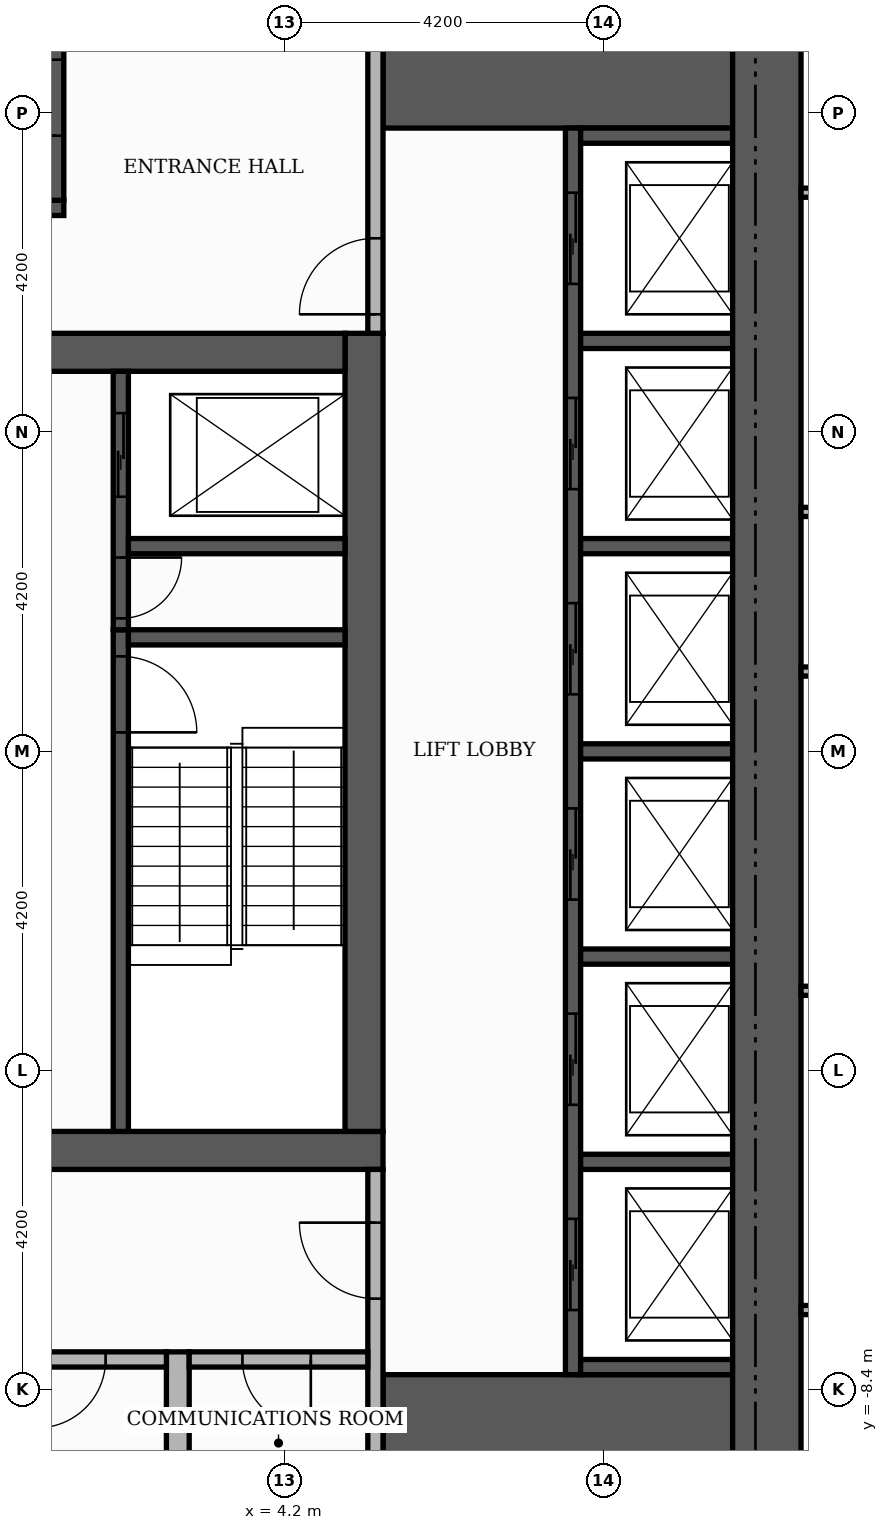
"""IFC4 building model, lengths in metres.
Left out: names, types, materials, properties, quantities, classifications, styles, units other than length and angle.
Written with IfcOpenShell. Run it as: python <this file> out.ifc"""

import sys

from ifc_helpers import new_model, si_unit, direction, frame, frame_2d, origin, place, context, subcontext, project, spatial, rectangle, extrude, element, fill, save


model = new_model("IFC4")
c1 = context("Model", 3, precision=1e-05, world=origin(), true_north=direction((0.0, 1.0)))
c2 = subcontext(c1, "Body", "Model", "MODEL_VIEW")
j1 = project(units=[si_unit("LENGTHUNIT", "METRE"), si_unit("PLANEANGLEUNIT", "RADIAN")], contexts=[c1])
p1 = place(None, origin())
s1 = spatial("IfcSite", under=j1, at=p1, CompositionType="ELEMENT")
p2 = place(p1, origin())
s2 = spatial("IfcBuilding", under=s1, at=p2, CompositionType="ELEMENT")
p3 = place(p2, frame((0.0, 0.0, 168.9)))
s3 = spatial("IfcBuildingStorey", under=s2, at=p3, CompositionType="ELEMENT", Elevation=168.9)
p4 = place(p3, frame((-5.5, -5.25, 0.0), z_axis=(0.0, 0.0, 1.0), x_axis=(1.0, 0.0, 0.0)))
e1 = element("IfcWall", 1, at=p4, inside=s3, PredefinedType="SHEAR", context=c2, shape_type="SweptSolid", body=[
    extrude(rectangle(XDim=11.0, YDim=0.5, at=frame_2d((5.5, 0.0))), origin(), (0.0, 0.0, 1.0), 3.48),
])
p5 = place(p4, frame((4.9, 0.0, 0.0)))
e2 = element("IfcOpeningElement", 2, at=p5, cuts=e1, PredefinedType="OPENING", context=c2, shape_type="SweptSolid", body=[
    extrude(rectangle(XDim=1.2, YDim=2.1, at=frame_2d((0.6, 1.05))), frame((0.0, 0.26, 0.0), z_axis=(0.0, -1.0, 0.0), x_axis=(1.0, 0.0, 0.0)), (0.0, 0.0, 1.0), 0.52),
])
p6 = place(p3, frame((5.25, -5.0, 0.0), z_axis=(0.0, 0.0, 1.0), x_axis=(0.0, 1.0, 0.0)))
e3 = element("IfcWall", 3, at=p6, inside=s3, PredefinedType="SHEAR", context=c2, shape_type="SweptSolid", body=[
    extrude(rectangle(XDim=10.5, YDim=0.5, at=frame_2d((5.25, 0.0))), origin(), (0.0, 0.0, 1.0), 3.48),
])
p7 = place(p3, frame((-5.0, 5.25, 0.0), z_axis=(0.0, 0.0, 1.0), x_axis=(1.0, 0.0, 0.0)))
e4 = element("IfcWall", 4, at=p7, inside=s3, PredefinedType="SHEAR", context=c2, shape_type="SweptSolid", body=[
    extrude(rectangle(XDim=10.0, YDim=0.5, at=frame_2d((5.0, 0.0))), origin(), (0.0, 0.0, 1.0), 3.48),
])
p8 = place(p7, frame((4.4, 0.0, 0.0)))
e5 = element("IfcOpeningElement", 5, at=p8, cuts=e4, PredefinedType="OPENING", context=c2, shape_type="SweptSolid", body=[
    extrude(rectangle(XDim=1.2, YDim=2.1, at=frame_2d((0.6, 1.05))), frame((0.0, 0.26, 0.0), z_axis=(0.0, -1.0, 0.0), x_axis=(1.0, 0.0, 0.0)), (0.0, 0.0, 1.0), 0.52),
])
for number, where, z_axis, x_axis in (
    (6, (5.5, -9.15, 0.0), (0.0, 0.0, 1.0), (1.0, 0.0, 0.0)),
    (7, (5.5, 9.15, 0.0), (0.0, 0.0, 1.0), (1.0, 0.0, 0.0)),
):
    element("IfcWall", number, at=place(p3, frame(where, z_axis=z_axis, x_axis=x_axis)), inside=s3, PredefinedType="SHEAR", context=c2, shape_type="SweptSolid", body=[
        extrude(rectangle(XDim=4.6, YDim=1.9, at=frame_2d((2.3, 0.0))), origin(), (0.0, 0.0, 1.0), 3.48),
    ])
p9 = place(p3, frame((2.05, -5.0, 0.0), z_axis=(0.0, 0.0, 1.0), x_axis=(0.0, 1.0, 0.0)))
e8 = element("IfcWall", 8, at=p9, inside=s3, PredefinedType="SHEAR", context=c2, shape_type="SweptSolid", body=[
    extrude(rectangle(XDim=6.6, YDim=0.2, at=frame_2d((3.3, 0.0))), origin(), (0.0, 0.0, 1.0), 3.48),
])
p10 = place(p9, frame((5.25, 0.0, 0.0)))
e9 = element("IfcOpeningElement", 9, at=p10, cuts=e8, PredefinedType="OPENING", context=c2, shape_type="SweptSolid", body=[
    extrude(rectangle(XDim=1.0, YDim=2.1, at=frame_2d((0.5, 1.05))), frame((0.0, 0.11, 0.0), z_axis=(0.0, -1.0, 0.0), x_axis=(1.0, 0.0, 0.0)), (0.0, 0.0, 1.0), 0.22),
])
p11 = place(p3, frame((2.15, 1.5, 0.0), z_axis=(0.0, 0.0, 1.0), x_axis=(1.0, 0.0, 0.0)))
e10 = element("IfcWall", 10, at=p11, inside=s3, PredefinedType="SHEAR", context=c2, shape_type="SweptSolid", body=[
    extrude(rectangle(XDim=2.85, YDim=0.2, at=frame_2d((1.425, 0.0))), origin(), (0.0, 0.0, 1.0), 3.48),
])
p12 = place(p3, frame((-5.5, 7.15, 0.0), z_axis=(0.0, 0.0, 1.0), x_axis=(1.0, 0.0, 0.0)))
e11 = element("IfcWall", 11, at=p12, inside=s3, PredefinedType="SHEAR", context=c2, shape_type="SweptSolid", body=[
    extrude(rectangle(XDim=6.8, YDim=0.2, at=frame_2d((3.4, 0.0))), origin(), (0.0, 0.0, 1.0), 3.48),
])
p13 = place(p3, frame((1.2, 7.25, 0.0), z_axis=(0.0, 0.0, 1.0), x_axis=(0.0, 1.0, 0.0)))
e12 = element("IfcWall", 12, at=p13, inside=s3, PredefinedType="SHEAR", context=c2, shape_type="SweptSolid", body=[
    extrude(rectangle(XDim=2.85, YDim=0.2, at=frame_2d((1.425, 0.0))), origin(), (0.0, 0.0, 1.0), 3.48),
])
p14 = place(p13, frame((0.85, 0.0, 0.0)))
e13 = element("IfcOpeningElement", 13, at=p14, cuts=e12, PredefinedType="OPENING", context=c2, shape_type="SweptSolid", body=[
    extrude(rectangle(XDim=1.0, YDim=2.1, at=frame_2d((0.5, 1.05))), frame((0.0, 0.11, 0.0), z_axis=(0.0, -1.0, 0.0), x_axis=(1.0, 0.0, 0.0)), (0.0, 0.0, 1.0), 0.22),
])
p15 = place(p3, frame((8.0, -8.2, 0.0), z_axis=(0.0, 0.0, 1.0), x_axis=(0.0, 1.0, 0.0)))
e14 = element("IfcWall", 14, at=p15, inside=s3, PredefinedType="SHEAR", context=c2, shape_type="SweptSolid", body=[
    extrude(rectangle(XDim=16.4, YDim=0.2, at=frame_2d((8.2, 0.0))), origin(), (0.0, 0.0, 1.0), 3.48),
])
p16 = place(p15, frame((0.85, 0.0, 0.0)))
e15 = element("IfcOpeningElement", 15, at=p16, cuts=e14, PredefinedType="OPENING", context=c2, shape_type="SweptSolid", body=[
    extrude(rectangle(XDim=1.2, YDim=2.1, at=frame_2d((0.6, 1.05))), frame((0.0, 0.11, 0.0), z_axis=(0.0, -1.0, 0.0), x_axis=(1.0, 0.0, 0.0)), (0.0, 0.0, 1.0), 0.22),
])
p17 = place(p15, frame((3.55, 0.0, 0.0)))
e16 = element("IfcOpeningElement", 16, at=p17, cuts=e14, PredefinedType="OPENING", context=c2, shape_type="SweptSolid", body=[
    extrude(rectangle(XDim=1.2, YDim=2.1, at=frame_2d((0.6, 1.05))), frame((0.0, 0.11, 0.0), z_axis=(0.0, -1.0, 0.0), x_axis=(1.0, 0.0, 0.0)), (0.0, 0.0, 1.0), 0.22),
])
p18 = place(p15, frame((6.25, 0.0, 0.0)))
e17 = element("IfcOpeningElement", 17, at=p18, cuts=e14, PredefinedType="OPENING", context=c2, shape_type="SweptSolid", body=[
    extrude(rectangle(XDim=1.2, YDim=2.1, at=frame_2d((0.6, 1.05))), frame((0.0, 0.11, 0.0), z_axis=(0.0, -1.0, 0.0), x_axis=(1.0, 0.0, 0.0)), (0.0, 0.0, 1.0), 0.22),
])
p19 = place(p15, frame((8.95, 0.0, 0.0)))
e18 = element("IfcOpeningElement", 18, at=p19, cuts=e14, PredefinedType="OPENING", context=c2, shape_type="SweptSolid", body=[
    extrude(rectangle(XDim=1.2, YDim=2.1, at=frame_2d((0.6, 1.05))), frame((0.0, 0.11, 0.0), z_axis=(0.0, -1.0, 0.0), x_axis=(1.0, 0.0, 0.0)), (0.0, 0.0, 1.0), 0.22),
])
p20 = place(p15, frame((11.65, 0.0, 0.0)))
e19 = element("IfcOpeningElement", 19, at=p20, cuts=e14, PredefinedType="OPENING", context=c2, shape_type="SweptSolid", body=[
    extrude(rectangle(XDim=1.2, YDim=2.1, at=frame_2d((0.6, 1.05))), frame((0.0, 0.11, 0.0), z_axis=(0.0, -1.0, 0.0), x_axis=(1.0, 0.0, 0.0)), (0.0, 0.0, 1.0), 0.22),
])
p21 = place(p15, frame((14.35, 0.0, 0.0)))
e20 = element("IfcOpeningElement", 20, at=p21, cuts=e14, PredefinedType="OPENING", context=c2, shape_type="SweptSolid", body=[
    extrude(rectangle(XDim=1.2, YDim=2.1, at=frame_2d((0.6, 1.05))), frame((0.0, 0.11, 0.0), z_axis=(0.0, -1.0, 0.0), x_axis=(1.0, 0.0, 0.0)), (0.0, 0.0, 1.0), 0.22),
])
for number, where, z_axis, x_axis in (
    (21, (8.1, -8.1, 0.0), (0.0, 0.0, 1.0), (1.0, 0.0, 0.0)),
    (22, (8.1, -5.4, 0.0), (0.0, 0.0, 1.0), (1.0, 0.0, 0.0)),
    (23, (8.1, -2.7, 0.0), (0.0, 0.0, 1.0), (1.0, 0.0, 0.0)),
    (24, (8.1, 0.0, 0.0), (0.0, 0.0, 1.0), (1.0, 0.0, 0.0)),
):
    element("IfcWall", number, at=place(p3, frame(where, z_axis=z_axis, x_axis=x_axis)), inside=s3, PredefinedType="SHEAR", context=c2, shape_type="SweptSolid", body=[
        extrude(rectangle(XDim=2.0, YDim=0.2, at=frame_2d((1.0, 0.0))), origin(), (0.0, 0.0, 1.0), 3.48),
    ])
p22 = place(p3, frame((2.05, 1.6, 0.0), z_axis=(0.0, 0.0, 1.0), x_axis=(0.0, 1.0, 0.0)))
e25 = element("IfcWall", 25, at=p22, inside=s3, PredefinedType="SHEAR", context=c2, shape_type="SweptSolid", body=[
    extrude(rectangle(XDim=3.4, YDim=0.2, at=frame_2d((1.7, 0.0))), origin(), (0.0, 0.0, 1.0), 3.48),
])
p23 = place(p22, frame((1.75, 0.0, 0.0)))
e26 = element("IfcOpeningElement", 26, at=p23, cuts=e25, PredefinedType="OPENING", context=c2, shape_type="SweptSolid", body=[
    extrude(rectangle(XDim=1.1, YDim=2.1, at=frame_2d((0.55, 1.05))), frame((0.0, 0.11, 0.0), z_axis=(0.0, -1.0, 0.0), x_axis=(1.0, 0.0, 0.0)), (0.0, 0.0, 1.0), 0.22),
])
p24 = place(p22, frame((0.15, 0.0, 0.0)))
e27 = element("IfcOpeningElement", 27, at=p24, cuts=e25, PredefinedType="OPENING", context=c2, shape_type="SweptSolid", body=[
    extrude(rectangle(XDim=0.8, YDim=2.1, at=frame_2d((0.4, 1.05))), frame((0.0, 0.11, 0.0), z_axis=(0.0, -1.0, 0.0), x_axis=(1.0, 0.0, 0.0)), (0.0, 0.0, 1.0), 0.22),
])
p25 = place(p3, frame((2.15, 2.7, 0.0), z_axis=(0.0, 0.0, 1.0), x_axis=(1.0, 0.0, 0.0)))
e28 = element("IfcWall", 28, at=p25, inside=s3, PredefinedType="SHEAR", context=c2, shape_type="SweptSolid", body=[
    extrude(rectangle(XDim=2.85, YDim=0.2, at=frame_2d((1.425, 0.0))), origin(), (0.0, 0.0, 1.0), 3.48),
])
for number, where, z_axis, x_axis in (
    (29, (8.1, 2.7, 0.0), (0.0, 0.0, 1.0), (1.0, 0.0, 0.0)),
    (30, (8.1, 5.4, 0.0), (0.0, 0.0, 1.0), (1.0, 0.0, 0.0)),
    (31, (8.1, 8.1, 0.0), (0.0, 0.0, 1.0), (1.0, 0.0, 0.0)),
):
    element("IfcWall", number, at=place(p3, frame(where, z_axis=z_axis, x_axis=x_axis)), inside=s3, PredefinedType="SHEAR", context=c2, shape_type="SweptSolid", body=[
        extrude(rectangle(XDim=2.0, YDim=0.2, at=frame_2d((1.0, 0.0))), origin(), (0.0, 0.0, 1.0), 3.48),
    ])
p26 = place(p3, frame((10.55, -10.1, 0.0), z_axis=(0.0, 0.0, 1.0), x_axis=(0.0, 1.0, 0.0)))
e32 = element("IfcWall", 32, at=p26, inside=s3, PredefinedType="SHEAR", context=c2, shape_type="SweptSolid", body=[
    extrude(rectangle(XDim=20.2, YDim=0.9, at=frame_2d((10.1, 0.0))), origin(), (0.0, 0.0, 1.0), 3.48),
])
p27 = place(p3, frame((2.8, -10.1, 0.0), z_axis=(0.0, 0.0, 1.0), x_axis=(0.0, 1.0, 0.0)))
e33 = element("IfcWall", 33, at=p27, inside=s3, PredefinedType="PARTITIONING", context=c2, shape_type="SweptSolid", body=[
    extrude(rectangle(XDim=2.2, YDim=0.3, at=frame_2d((1.1, 0.0))), origin(), (0.0, 0.0, 1.0), 3.48),
])
p28 = place(p3, frame((5.4, -10.1, 0.0), z_axis=(0.0, 0.0, 1.0), x_axis=(0.0, 1.0, 0.0)))
e34 = element("IfcWall", 34, at=p28, inside=s3, PredefinedType="PARTITIONING", context=c2, shape_type="SweptSolid", body=[
    extrude(rectangle(XDim=4.6, YDim=0.2, at=frame_2d((2.3, 0.0))), origin(), (0.0, 0.0, 1.0), 3.48),
])
p29 = place(p28, frame((2.9, 0.0, 0.0)))
e35 = element("IfcOpeningElement", 35, at=p29, cuts=e34, PredefinedType="OPENING", context=c2, shape_type="SweptSolid", body=[
    extrude(rectangle(XDim=1.0, YDim=2.1, at=frame_2d((0.5, 1.05))), frame((0.0, 0.11, 0.0), z_axis=(0.0, -1.0, 0.0), x_axis=(1.0, 0.0, 0.0)), (0.0, 0.0, 1.0), 0.22),
])
p30 = place(p3, frame((0.1, -8.0, 0.0), z_axis=(0.0, 0.0, 1.0), x_axis=(1.0, 0.0, 0.0)))
e36 = element("IfcWall", 36, at=p30, inside=s3, PredefinedType="PARTITIONING", context=c2, shape_type="SweptSolid", body=[
    extrude(rectangle(XDim=2.55, YDim=0.2, at=frame_2d((1.275, 0.0))), origin(), (0.0, 0.0, 1.0), 3.48),
])
p31 = place(p30, frame((0.85, 0.0, 0.0)))
e37 = element("IfcOpeningElement", 37, at=p31, cuts=e36, PredefinedType="OPENING", context=c2, shape_type="SweptSolid", body=[
    extrude(rectangle(XDim=0.9, YDim=2.1, at=frame_2d((0.45, 1.05))), frame((0.0, 0.11, 0.0), z_axis=(0.0, -1.0, 0.0), x_axis=(1.0, 0.0, 0.0)), (0.0, 0.0, 1.0), 0.22),
])
p32 = place(p3, frame((2.95, -8.0, 0.0), z_axis=(0.0, 0.0, 1.0), x_axis=(1.0, 0.0, 0.0)))
e38 = element("IfcWall", 38, at=p32, inside=s3, PredefinedType="PARTITIONING", context=c2, shape_type="SweptSolid", body=[
    extrude(rectangle(XDim=2.35, YDim=0.2, at=frame_2d((1.175, 0.0))), origin(), (0.0, 0.0, 1.0), 3.48),
])
p33 = place(p32, frame((0.7, 0.0, 0.0)))
e39 = element("IfcOpeningElement", 39, at=p33, cuts=e38, PredefinedType="OPENING", context=c2, shape_type="SweptSolid", body=[
    extrude(rectangle(XDim=0.9, YDim=2.1, at=frame_2d((0.45, 1.05))), frame((0.0, 0.11, 0.0), z_axis=(0.0, -1.0, 0.0), x_axis=(1.0, 0.0, 0.0)), (0.0, 0.0, 1.0), 0.22),
])
p34 = place(p3, frame((5.4, 5.5, 0.0), z_axis=(0.0, 0.0, 1.0), x_axis=(0.0, 1.0, 0.0)))
e40 = element("IfcWall", 40, at=p34, inside=s3, PredefinedType="PARTITIONING", context=c2, shape_type="SweptSolid", body=[
    extrude(rectangle(XDim=4.6, YDim=0.2, at=frame_2d((2.3, 0.0))), origin(), (0.0, 0.0, 1.0), 3.48),
])
p35 = place(p34, frame((0.25, 0.0, 0.0)))
e41 = element("IfcOpeningElement", 41, at=p35, cuts=e40, PredefinedType="OPENING", context=c2, shape_type="SweptSolid", body=[
    extrude(rectangle(XDim=1.0, YDim=2.1, at=frame_2d((0.5, 1.05))), frame((0.0, 0.11, 0.0), z_axis=(0.0, -1.0, 0.0), x_axis=(1.0, 0.0, 0.0)), (0.0, 0.0, 1.0), 0.22),
])
p36 = place(p3, frame((11.0, -7.35, 0.0), z_axis=(0.0, 0.0, 1.0), x_axis=(1.0, 0.0, 0.0)))
e42 = element("IfcWall", 42, at=p36, inside=s3, PredefinedType="PARTITIONING", context=c2, shape_type="SweptSolid", body=[
    extrude(rectangle(XDim=7.32, YDim=0.12, at=frame_2d((3.66, 0.0))), origin(), (0.0, 0.0, 1.0), 3.48),
])
p37 = place(p36, frame((3.21, 0.0, 0.0)))
e43 = element("IfcOpeningElement", 43, at=p37, cuts=e42, PredefinedType="OPENING", context=c2, shape_type="SweptSolid", body=[
    extrude(rectangle(XDim=0.9, YDim=2.1, at=frame_2d((0.45, 1.05))), frame((0.0, 0.07, 0.0), z_axis=(0.0, -1.0, 0.0), x_axis=(1.0, 0.0, 0.0)), (0.0, 0.0, 1.0), 0.14),
])
for number, where, z_axis, x_axis in (
    (44, (11.0, -3.15, 0.0), (0.0, 0.0, 1.0), (1.0, 0.0, 0.0)),
    (45, (11.0, 1.05, 0.0), (0.0, 0.0, 1.0), (1.0, 0.0, 0.0)),
    (46, (11.0, 3.15, 0.0), (0.0, 0.0, 1.0), (1.0, 0.0, 0.0)),
    (47, (11.0, 7.35, 0.0), (0.0, 0.0, 1.0), (1.0, 0.0, 0.0)),
):
    element("IfcWall", number, at=place(p3, frame(where, z_axis=z_axis, x_axis=x_axis)), inside=s3, PredefinedType="PARTITIONING", context=c2, shape_type="SweptSolid", body=[
        extrude(rectangle(XDim=7.32, YDim=0.12, at=frame_2d((3.66, 0.0))), origin(), (0.0, 0.0, 1.0), 3.48),
    ])
p38 = place(p16, origin())
e48 = element("IfcDoor", 48, at=p38, inside=s3, OperationType="SLIDING_TO_LEFT", PredefinedType="DOOR", context=c2, shape_type="SweptSolid", body=[
    extrude(rectangle(XDim=1.2, YDim=2.1, at=frame_2d((0.6, 1.05))), frame((0.0, 0.025, 0.0), z_axis=(0.0, -1.0, 0.0), x_axis=(1.0, 0.0, 0.0)), (0.0, 0.0, 1.0), 0.05),
])
fill(e15, e48)
p39 = place(p17, origin())
e49 = element("IfcDoor", 49, at=p39, inside=s3, OperationType="SLIDING_TO_LEFT", PredefinedType="DOOR", context=c2, shape_type="SweptSolid", body=[
    extrude(rectangle(XDim=1.2, YDim=2.1, at=frame_2d((0.6, 1.05))), frame((0.0, 0.025, 0.0), z_axis=(0.0, -1.0, 0.0), x_axis=(1.0, 0.0, 0.0)), (0.0, 0.0, 1.0), 0.05),
])
fill(e16, e49)
p40 = place(p18, origin())
e50 = element("IfcDoor", 50, at=p40, inside=s3, OperationType="SLIDING_TO_LEFT", PredefinedType="DOOR", context=c2, shape_type="SweptSolid", body=[
    extrude(rectangle(XDim=1.2, YDim=2.1, at=frame_2d((0.6, 1.05))), frame((0.0, 0.025, 0.0), z_axis=(0.0, -1.0, 0.0), x_axis=(1.0, 0.0, 0.0)), (0.0, 0.0, 1.0), 0.05),
])
fill(e17, e50)
p41 = place(p19, origin())
e51 = element("IfcDoor", 51, at=p41, inside=s3, OperationType="SLIDING_TO_LEFT", PredefinedType="DOOR", context=c2, shape_type="SweptSolid", body=[
    extrude(rectangle(XDim=1.2, YDim=2.1, at=frame_2d((0.6, 1.05))), frame((0.0, 0.025, 0.0), z_axis=(0.0, -1.0, 0.0), x_axis=(1.0, 0.0, 0.0)), (0.0, 0.0, 1.0), 0.05),
])
fill(e18, e51)
p42 = place(p20, origin())
e52 = element("IfcDoor", 52, at=p42, inside=s3, OperationType="SLIDING_TO_LEFT", PredefinedType="DOOR", context=c2, shape_type="SweptSolid", body=[
    extrude(rectangle(XDim=1.2, YDim=2.1, at=frame_2d((0.6, 1.05))), frame((0.0, 0.025, 0.0), z_axis=(0.0, -1.0, 0.0), x_axis=(1.0, 0.0, 0.0)), (0.0, 0.0, 1.0), 0.05),
])
fill(e19, e52)
p43 = place(p21, origin())
e53 = element("IfcDoor", 53, at=p43, inside=s3, OperationType="SLIDING_TO_LEFT", PredefinedType="DOOR", context=c2, shape_type="SweptSolid", body=[
    extrude(rectangle(XDim=1.2, YDim=2.1, at=frame_2d((0.6, 1.05))), frame((0.0, 0.025, 0.0), z_axis=(0.0, -1.0, 0.0), x_axis=(1.0, 0.0, 0.0)), (0.0, 0.0, 1.0), 0.05),
])
fill(e20, e53)
p44 = place(p23, origin())
e54 = element("IfcDoor", 54, at=p44, inside=s3, OperationType="SLIDING_TO_LEFT", PredefinedType="DOOR", context=c2, shape_type="SweptSolid", body=[
    extrude(rectangle(XDim=1.1, YDim=2.1, at=frame_2d((0.55, 1.05))), frame((0.0, 0.025, 0.0), z_axis=(0.0, -1.0, 0.0), x_axis=(1.0, 0.0, 0.0)), (0.0, 0.0, 1.0), 0.05),
])
fill(e26, e54)
p45 = place(p10, frame((1.0, 0.0, 0.0), z_axis=(0.0, 0.0, 1.0), x_axis=(-1.0, 0.0, 0.0)))
e55 = element("IfcDoor", 55, at=p45, inside=s3, OperationType="SINGLE_SWING_LEFT", PredefinedType="DOOR", context=c2, shape_type="SweptSolid", body=[
    extrude(rectangle(XDim=1.0, YDim=2.1, at=frame_2d((0.5, 1.05))), frame((0.0, 0.025, 0.0), z_axis=(0.0, -1.0, 0.0), x_axis=(1.0, 0.0, 0.0)), (0.0, 0.0, 1.0), 0.05),
])
fill(e9, e55)
p46 = place(p24, frame((0.8, 0.0, 0.0), z_axis=(0.0, 0.0, 1.0), x_axis=(-1.0, 0.0, 0.0)))
e56 = element("IfcDoor", 56, at=p46, inside=s3, OperationType="SINGLE_SWING_RIGHT", PredefinedType="DOOR", context=c2, shape_type="SweptSolid", body=[
    extrude(rectangle(XDim=0.8, YDim=2.1, at=frame_2d((0.4, 1.05))), frame((0.0, 0.025, 0.0), z_axis=(0.0, -1.0, 0.0), x_axis=(1.0, 0.0, 0.0)), (0.0, 0.0, 1.0), 0.05),
])
fill(e27, e56)
p47 = place(p14, origin())
e57 = element("IfcDoor", 57, at=p47, inside=s3, OperationType="SINGLE_SWING_LEFT", PredefinedType="DOOR", context=c2, shape_type="SweptSolid", body=[
    extrude(rectangle(XDim=1.0, YDim=2.1, at=frame_2d((0.5, 1.05))), frame((0.0, 0.025, 0.0), z_axis=(0.0, -1.0, 0.0), x_axis=(1.0, 0.0, 0.0)), (0.0, 0.0, 1.0), 0.05),
])
fill(e13, e57)
p48 = place(p35, origin())
e58 = element("IfcDoor", 58, at=p48, inside=s3, OperationType="SINGLE_SWING_LEFT", PredefinedType="DOOR", context=c2, shape_type="SweptSolid", body=[
    extrude(rectangle(XDim=1.0, YDim=2.1, at=frame_2d((0.5, 1.05))), frame((0.0, 0.025, 0.0), z_axis=(0.0, -1.0, 0.0), x_axis=(1.0, 0.0, 0.0)), (0.0, 0.0, 1.0), 0.05),
])
fill(e41, e58)
p49 = place(p29, origin())
e59 = element("IfcDoor", 59, at=p49, inside=s3, OperationType="SINGLE_SWING_RIGHT", PredefinedType="DOOR", context=c2, shape_type="SweptSolid", body=[
    extrude(rectangle(XDim=1.0, YDim=2.1, at=frame_2d((0.5, 1.05))), frame((0.0, 0.025, 0.0), z_axis=(0.0, -1.0, 0.0), x_axis=(1.0, 0.0, 0.0)), (0.0, 0.0, 1.0), 0.05),
])
fill(e35, e59)
p50 = place(p31, frame((0.9, 0.0, 0.0), z_axis=(0.0, 0.0, 1.0), x_axis=(-1.0, 0.0, 0.0)))
e60 = element("IfcDoor", 60, at=p50, inside=s3, OperationType="SINGLE_SWING_LEFT", PredefinedType="DOOR", context=c2, shape_type="SweptSolid", body=[
    extrude(rectangle(XDim=0.9, YDim=2.1, at=frame_2d((0.45, 1.05))), frame((0.0, 0.025, 0.0), z_axis=(0.0, -1.0, 0.0), x_axis=(1.0, 0.0, 0.0)), (0.0, 0.0, 1.0), 0.05),
])
fill(e37, e60)
p51 = place(p33, frame((0.9, 0.0, 0.0), z_axis=(0.0, 0.0, 1.0), x_axis=(-1.0, 0.0, 0.0)))
e61 = element("IfcDoor", 61, at=p51, inside=s3, OperationType="SINGLE_SWING_RIGHT", PredefinedType="DOOR", context=c2, shape_type="SweptSolid", body=[
    extrude(rectangle(XDim=0.9, YDim=2.1, at=frame_2d((0.45, 1.05))), frame((0.0, 0.025, 0.0), z_axis=(0.0, -1.0, 0.0), x_axis=(1.0, 0.0, 0.0)), (0.0, 0.0, 1.0), 0.05),
])
fill(e39, e61)
save(model, sys.argv[1])
